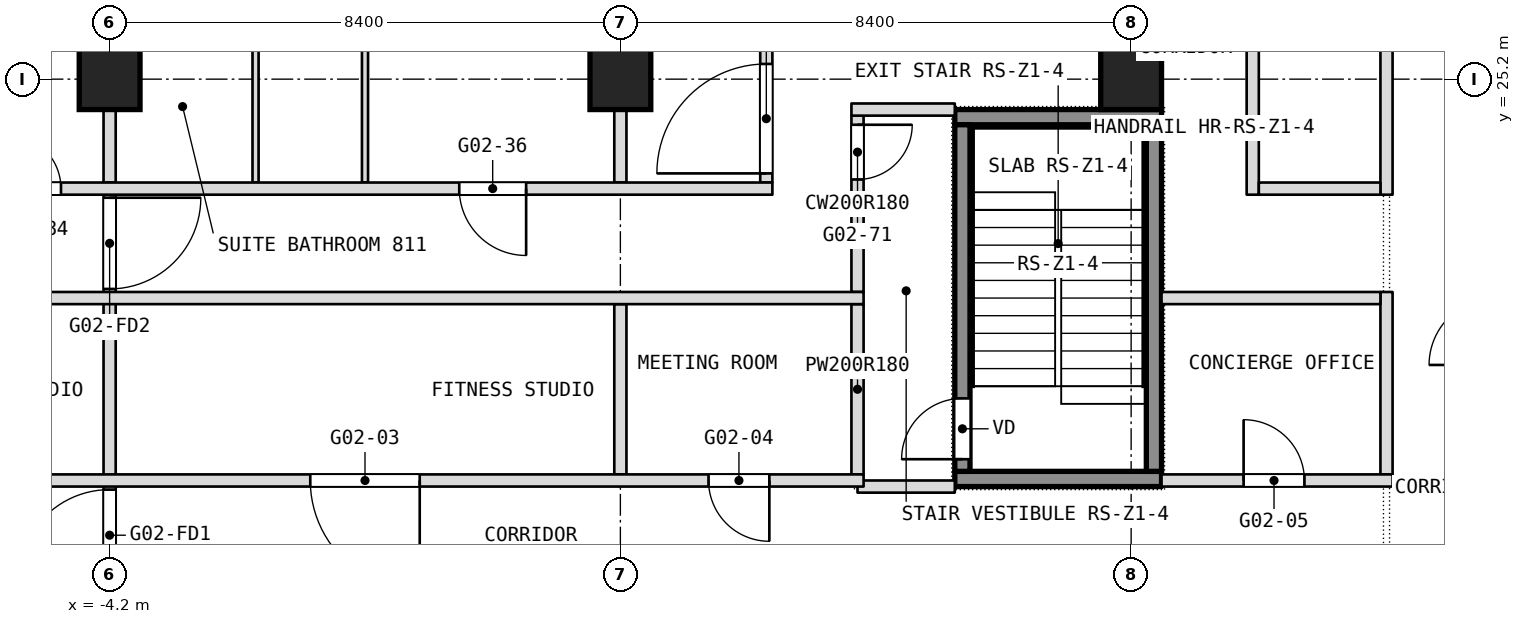
"""IFC4 building model, lengths in metres.
Left out: names, types, materials, properties, quantities, classifications, styles, units other than length and angle.
Written with IfcOpenShell. Run it as: python <this file> out.ifc"""

import sys

from ifc_helpers import new_model, si_unit, direction, frame, frame_2d, origin, origin_2d, place, context, subcontext, project, spatial, rectangle, extrude, element, fill, save


model = new_model("IFC4")
c1 = context("Model", 3, precision=1e-05, world=origin(), true_north=direction((0.0, 1.0)))
c2 = subcontext(c1, "Body", "Model", "MODEL_VIEW")
j1 = project(units=[si_unit("LENGTHUNIT", "METRE"), si_unit("PLANEANGLEUNIT", "RADIAN")], contexts=[c1])
p1 = place(None, origin())
s1 = spatial("IfcSite", under=j1, at=p1, CompositionType="ELEMENT")
p2 = place(p1, origin())
s2 = spatial("IfcBuilding", under=s1, at=p2, CompositionType="ELEMENT")
p3 = place(p2, frame((0.0, 0.0, 43.7)))
s3 = spatial("IfcBuildingStorey", under=s2, at=p3, CompositionType="ELEMENT", Elevation=43.7)
for number, where, z_axis, x_axis in (
    (1, (-4.2, 25.2, 0.0), (0.0, 0.0, 1.0), (1.0, 0.0, 0.0)),
    (2, (4.2, 25.2, 0.0), (0.0, 0.0, 1.0), (1.0, 0.0, 0.0)),
    (3, (12.6, 25.2, 0.0), (0.0, 0.0, 1.0), (1.0, 0.0, 0.0)),
):
    element("IfcColumn", number, at=place(p3, frame(where, z_axis=z_axis, x_axis=x_axis)), inside=s3, PredefinedType="COLUMN", context=c2, shape_type="SweptSolid", body=[
        extrude(rectangle(XDim=1.0, YDim=1.0, at=origin_2d()), origin(), (0.0, 0.0, 1.0), 3.6),
    ])
p4 = place(p3, frame((16.8, 18.7, 0.0), z_axis=(0.0, 0.0, 1.0), x_axis=(0.0, 1.0, 0.0)))
e4 = element("IfcWall", 4, at=p4, inside=s3, PredefinedType="PARTITIONING", context=c2, shape_type="SweptSolid", body=[
    extrude(rectangle(XDim=3.0, YDim=0.2, at=frame_2d((1.5, 0.0))), origin(), (0.0, 0.0, 1.0), 3.34),
])
p5 = place(p3, frame((16.8, 23.3, 0.0), z_axis=(0.0, 0.0, 1.0), x_axis=(0.0, 1.0, 0.0)))
e5 = element("IfcWall", 5, at=p5, inside=s3, PredefinedType="PARTITIONING", context=c2, shape_type="SweptSolid", body=[
    extrude(rectangle(XDim=10.24, YDim=0.2, at=frame_2d((5.12, 0.0))), origin(), (0.0, 0.0, 1.0), 3.34),
])
p6 = place(p5, frame((4.8, 0.0, 0.0)))
e6 = element("IfcOpeningElement", 6, at=p6, cuts=e5, PredefinedType="OPENING", context=c2, shape_type="SweptSolid", body=[
    extrude(rectangle(XDim=1.0, YDim=2.1, at=frame_2d((0.5, 1.05))), frame((0.0, 0.1, 0.0), z_axis=(0.0, -1.0, 0.0), x_axis=(1.0, 0.0, 0.0)), (0.0, 0.0, 1.0), 0.2),
])
p7 = place(p3, frame((14.6, 23.3, 0.0), z_axis=(0.0, 0.0, 1.0), x_axis=(0.0, 1.0, 0.0)))
e7 = element("IfcWall", 7, at=p7, inside=s3, PredefinedType="PARTITIONING", context=c2, shape_type="SweptSolid", body=[
    extrude(rectangle(XDim=3.4, YDim=0.2, at=frame_2d((1.7, 0.0))), origin(), (0.0, 0.0, 1.0), 3.34),
])
p8 = place(p3, frame((8.1, 18.7, 0.0), z_axis=(0.0, 0.0, 1.0), x_axis=(0.0, 1.0, 0.0)))
e8 = element("IfcWall", 8, at=p8, inside=s3, PredefinedType="PARTITIONING", context=c2, shape_type="SweptSolid", body=[
    extrude(rectangle(XDim=2.8, YDim=0.2, at=frame_2d((1.4, 0.0))), origin(), (0.0, 0.0, 1.0), 3.34),
])
p9 = place(p3, frame((8.1, 21.7, 0.0), z_axis=(0.0, 0.0, 1.0), x_axis=(0.0, 1.0, 0.0)))
e9 = element("IfcWall", 9, at=p9, inside=s3, PredefinedType="PARTITIONING", context=c2, shape_type="SweptSolid", body=[
    extrude(rectangle(XDim=2.9, YDim=0.2, at=frame_2d((1.45, 0.0))), origin(), (0.0, 0.0, 1.0), 3.34),
])
p10 = place(p9, frame((1.85, 0.0, 0.0)))
e10 = element("IfcOpeningElement", 10, at=p10, cuts=e9, PredefinedType="OPENING", context=c2, shape_type="SweptSolid", body=[
    extrude(rectangle(XDim=0.9, YDim=2.1, at=frame_2d((0.45, 1.05))), frame((0.0, 0.1, 0.0), z_axis=(0.0, -1.0, 0.0), x_axis=(1.0, 0.0, 0.0)), (0.0, 0.0, 1.0), 0.2),
])
p11 = place(p3, frame((6.6, 23.5, 0.0), z_axis=(0.0, 0.0, 1.0), x_axis=(0.0, 1.0, 0.0)))
e11 = element("IfcWall", 11, at=p11, inside=s3, PredefinedType="PARTITIONING", context=c2, shape_type="SweptSolid", body=[
    extrude(rectangle(XDim=3.4, YDim=0.2, at=frame_2d((1.7, 0.0))), origin(), (0.0, 0.0, 1.0), 3.34),
])
p12 = place(p11, frame((0.15, 0.0, 0.0)))
e12 = element("IfcOpeningElement", 12, at=p12, cuts=e11, PredefinedType="OPENING", context=c2, shape_type="SweptSolid", body=[
    extrude(rectangle(XDim=1.8, YDim=2.1, at=frame_2d((0.9, 1.05))), frame((0.0, 0.1, 0.0), z_axis=(0.0, -1.0, 0.0), x_axis=(1.0, 0.0, 0.0)), (0.0, 0.0, 1.0), 0.2),
])
p13 = place(p3, frame((4.2, 18.7, 0.0), z_axis=(0.0, 0.0, 1.0), x_axis=(0.0, 1.0, 0.0)))
e13 = element("IfcWall", 13, at=p13, inside=s3, PredefinedType="PARTITIONING", context=c2, shape_type="SweptSolid", body=[
    extrude(rectangle(XDim=2.8, YDim=0.2, at=frame_2d((1.4, 0.0))), origin(), (0.0, 0.0, 1.0), 3.34),
])
p14 = place(p3, frame((4.2, 23.5, 0.0), z_axis=(0.0, 0.0, 1.0), x_axis=(0.0, 1.0, 0.0)))
e14 = element("IfcWall", 14, at=p14, inside=s3, PredefinedType="PARTITIONING", context=c2, shape_type="SweptSolid", body=[
    extrude(rectangle(XDim=10.04, YDim=0.2, at=frame_2d((5.02, 0.0))), origin(), (0.0, 0.0, 1.0), 3.34),
])
p15 = place(p3, frame((0.0, 23.5, 0.0), z_axis=(0.0, 0.0, 1.0), x_axis=(0.0, 1.0, 0.0)))
e15 = element("IfcWall", 15, at=p15, inside=s3, PredefinedType="PARTITIONING", context=c2, shape_type="SweptSolid", body=[
    extrude(rectangle(XDim=10.04, YDim=0.1, at=frame_2d((5.02, 0.0))), origin(), (0.0, 0.0, 1.0), 3.34),
])
p16 = place(p15, frame((5.57, 0.0, 0.0)))
e16 = element("IfcOpeningElement", 16, at=p16, cuts=e15, PredefinedType="OPENING", context=c2, shape_type="SweptSolid", body=[
    extrude(rectangle(XDim=0.9, YDim=2.1, at=frame_2d((0.45, 1.05))), frame((0.0, 0.05, 0.0), z_axis=(0.0, -1.0, 0.0), x_axis=(1.0, 0.0, 0.0)), (0.0, 0.0, 1.0), 0.1),
])
p17 = place(p3, frame((-1.8, 23.5, 0.0), z_axis=(0.0, 0.0, 1.0), x_axis=(0.0, 1.0, 0.0)))
e17 = element("IfcWall", 17, at=p17, inside=s3, PredefinedType="PARTITIONING", context=c2, shape_type="SweptSolid", body=[
    extrude(rectangle(XDim=3.55, YDim=0.1, at=frame_2d((1.775, 0.0))), origin(), (0.0, 0.0, 1.0), 3.34),
])
p18 = place(p3, frame((-4.2, 16.8, 0.0), z_axis=(0.0, 0.0, 1.0), x_axis=(0.0, 1.0, 0.0)))
e18 = element("IfcWall", 18, at=p18, inside=s3, PredefinedType="PARTITIONING", context=c2, shape_type="SweptSolid", body=[
    extrude(rectangle(XDim=6.7, YDim=0.2, at=frame_2d((3.35, 0.0))), origin(), (0.0, 0.0, 1.0), 3.34),
])
p19 = place(p18, frame((0.15, 0.0, 0.0)))
e19 = element("IfcOpeningElement", 19, at=p19, cuts=e18, PredefinedType="OPENING", context=c2, shape_type="SweptSolid", body=[
    extrude(rectangle(XDim=1.5, YDim=2.1, at=frame_2d((0.75, 1.05))), frame((0.0, 0.1, 0.0), z_axis=(0.0, -1.0, 0.0), x_axis=(1.0, 0.0, 0.0)), (0.0, 0.0, 1.0), 0.2),
])
p20 = place(p18, frame((4.95, 0.0, 0.0)))
e20 = element("IfcOpeningElement", 20, at=p20, cuts=e18, PredefinedType="OPENING", context=c2, shape_type="SweptSolid", body=[
    extrude(rectangle(XDim=1.5, YDim=2.1, at=frame_2d((0.75, 1.05))), frame((0.0, 0.1, 0.0), z_axis=(0.0, -1.0, 0.0), x_axis=(1.0, 0.0, 0.0)), (0.0, 0.0, 1.0), 0.2),
])
p21 = place(p3, frame((-4.2, 23.5, 0.0), z_axis=(0.0, 0.0, 1.0), x_axis=(0.0, 1.0, 0.0)))
e21 = element("IfcWall", 21, at=p21, inside=s3, PredefinedType="PARTITIONING", context=c2, shape_type="SweptSolid", body=[
    extrude(rectangle(XDim=10.04, YDim=0.2, at=frame_2d((5.02, 0.0))), origin(), (0.0, 0.0, 1.0), 3.34),
])
p22 = place(p3, frame((8.1, 18.5, 0.0), z_axis=(0.0, 0.0, 1.0), x_axis=(1.0, 0.0, 0.0)))
e22 = element("IfcWall", 22, at=p22, inside=s3, PredefinedType="PARTITIONING", context=c2, shape_type="SweptSolid", body=[
    extrude(rectangle(XDim=1.6, YDim=0.2, at=frame_2d((0.8, 0.0))), origin(), (0.0, 0.0, 1.0), 3.34),
])
p23 = place(p3, frame((-16.9, 18.6, 0.0), z_axis=(0.0, 0.0, 1.0), x_axis=(1.0, 0.0, 0.0)))
e23 = element("IfcWall", 23, at=p23, inside=s3, PredefinedType="PARTITIONING", context=c2, shape_type="SweptSolid", body=[
    extrude(rectangle(XDim=25.1, YDim=0.2, at=frame_2d((12.55, 0.0))), origin(), (0.0, 0.0, 1.0), 3.34),
])
p24 = place(p23, frame((1.7, 0.0, 0.0)))
e24 = element("IfcOpeningElement", 24, at=p24, cuts=e23, PredefinedType="OPENING", context=c2, shape_type="SweptSolid", body=[
    extrude(rectangle(XDim=1.0, YDim=2.1, at=frame_2d((0.5, 1.05))), frame((0.0, 0.1, 0.0), z_axis=(0.0, -1.0, 0.0), x_axis=(1.0, 0.0, 0.0)), (0.0, 0.0, 1.0), 0.2),
])
p25 = place(p23, frame((7.6, 0.0, 0.0)))
e25 = element("IfcOpeningElement", 25, at=p25, cuts=e23, PredefinedType="OPENING", context=c2, shape_type="SweptSolid", body=[
    extrude(rectangle(XDim=1.8, YDim=2.1, at=frame_2d((0.9, 1.05))), frame((0.0, 0.1, 0.0), z_axis=(0.0, -1.0, 0.0), x_axis=(1.0, 0.0, 0.0)), (0.0, 0.0, 1.0), 0.2),
])
p26 = place(p23, frame((16.0, 0.0, 0.0)))
e26 = element("IfcOpeningElement", 26, at=p26, cuts=e23, PredefinedType="OPENING", context=c2, shape_type="SweptSolid", body=[
    extrude(rectangle(XDim=1.8, YDim=2.1, at=frame_2d((0.9, 1.05))), frame((0.0, 0.1, 0.0), z_axis=(0.0, -1.0, 0.0), x_axis=(1.0, 0.0, 0.0)), (0.0, 0.0, 1.0), 0.2),
])
p27 = place(p23, frame((22.55, 0.0, 0.0)))
e27 = element("IfcOpeningElement", 27, at=p27, cuts=e23, PredefinedType="OPENING", context=c2, shape_type="SweptSolid", body=[
    extrude(rectangle(XDim=1.0, YDim=2.1, at=frame_2d((0.5, 1.05))), frame((0.0, 0.1, 0.0), z_axis=(0.0, -1.0, 0.0), x_axis=(1.0, 0.0, 0.0)), (0.0, 0.0, 1.0), 0.2),
])
p28 = place(p3, frame((13.1, 18.6, 0.0), z_axis=(0.0, 0.0, 1.0), x_axis=(1.0, 0.0, 0.0)))
e28 = element("IfcWall", 28, at=p28, inside=s3, PredefinedType="PARTITIONING", context=c2, shape_type="SweptSolid", body=[
    extrude(rectangle(XDim=3.8, YDim=0.2, at=frame_2d((1.9, 0.0))), origin(), (0.0, 0.0, 1.0), 3.34),
])
p29 = place(p28, frame((1.35, 0.0, 0.0)))
e29 = element("IfcOpeningElement", 29, at=p29, cuts=e28, PredefinedType="OPENING", context=c2, shape_type="SweptSolid", body=[
    extrude(rectangle(XDim=1.0, YDim=2.1, at=frame_2d((0.5, 1.05))), frame((0.0, 0.1, 0.0), z_axis=(0.0, -1.0, 0.0), x_axis=(1.0, 0.0, 0.0)), (0.0, 0.0, 1.0), 0.2),
])
p30 = place(p3, frame((-16.7, 21.6, 0.0), z_axis=(0.0, 0.0, 1.0), x_axis=(1.0, 0.0, 0.0)))
e30 = element("IfcWall", 30, at=p30, inside=s3, PredefinedType="PARTITIONING", context=c2, shape_type="SweptSolid", body=[
    extrude(rectangle(XDim=24.9, YDim=0.2, at=frame_2d((12.45, 0.0))), origin(), (0.0, 0.0, 1.0), 3.34),
])
p31 = place(p3, frame((13.1, 21.6, 0.0), z_axis=(0.0, 0.0, 1.0), x_axis=(1.0, 0.0, 0.0)))
e31 = element("IfcWall", 31, at=p31, inside=s3, PredefinedType="PARTITIONING", context=c2, shape_type="SweptSolid", body=[
    extrude(rectangle(XDim=3.6, YDim=0.2, at=frame_2d((1.8, 0.0))), origin(), (0.0, 0.0, 1.0), 3.34),
])
p32 = place(p3, frame((-16.7, 23.4, 0.0), z_axis=(0.0, 0.0, 1.0), x_axis=(1.0, 0.0, 0.0)))
e32 = element("IfcWall", 32, at=p32, inside=s3, PredefinedType="PARTITIONING", context=c2, shape_type="SweptSolid", body=[
    extrude(rectangle(XDim=23.4, YDim=0.2, at=frame_2d((11.7, 0.0))), origin(), (0.0, 0.0, 1.0), 3.34),
])
p33 = place(p32, frame((2.4, 0.0, 0.0)))
e33 = element("IfcOpeningElement", 33, at=p33, cuts=e32, PredefinedType="OPENING", context=c2, shape_type="SweptSolid", body=[
    extrude(rectangle(XDim=0.9, YDim=2.1, at=frame_2d((0.45, 1.05))), frame((0.0, 0.1, 0.0), z_axis=(0.0, -1.0, 0.0), x_axis=(1.0, 0.0, 0.0)), (0.0, 0.0, 1.0), 0.2),
])
p34 = place(p32, frame((4.9, 0.0, 0.0)))
e34 = element("IfcOpeningElement", 34, at=p34, cuts=e32, PredefinedType="OPENING", context=c2, shape_type="SweptSolid", body=[
    extrude(rectangle(XDim=0.9, YDim=2.1, at=frame_2d((0.45, 1.05))), frame((0.0, 0.1, 0.0), z_axis=(0.0, -1.0, 0.0), x_axis=(1.0, 0.0, 0.0)), (0.0, 0.0, 1.0), 0.2),
])
p35 = place(p32, frame((10.8, 0.0, 0.0)))
e35 = element("IfcOpeningElement", 35, at=p35, cuts=e32, PredefinedType="OPENING", context=c2, shape_type="SweptSolid", body=[
    extrude(rectangle(XDim=0.9, YDim=2.1, at=frame_2d((0.45, 1.05))), frame((0.0, 0.1, 0.0), z_axis=(0.0, -1.0, 0.0), x_axis=(1.0, 0.0, 0.0)), (0.0, 0.0, 1.0), 0.2),
])
p36 = place(p32, frame((18.25, 0.0, 0.0)))
e36 = element("IfcOpeningElement", 36, at=p36, cuts=e32, PredefinedType="OPENING", context=c2, shape_type="SweptSolid", body=[
    extrude(rectangle(XDim=1.1, YDim=2.1, at=frame_2d((0.55, 1.05))), frame((0.0, 0.1, 0.0), z_axis=(0.0, -1.0, 0.0), x_axis=(1.0, 0.0, 0.0)), (0.0, 0.0, 1.0), 0.2),
])
p37 = place(p3, frame((14.7, 23.4, 0.0), z_axis=(0.0, 0.0, 1.0), x_axis=(1.0, 0.0, 0.0)))
e37 = element("IfcWall", 37, at=p37, inside=s3, PredefinedType="PARTITIONING", context=c2, shape_type="SweptSolid", body=[
    extrude(rectangle(XDim=2.0, YDim=0.2, at=frame_2d((1.0, 0.0))), origin(), (0.0, 0.0, 1.0), 3.34),
])
p38 = place(p3, frame((8.0, 24.7, 0.0), z_axis=(0.0, 0.0, 1.0), x_axis=(1.0, 0.0, 0.0)))
e38 = element("IfcWall", 38, at=p38, inside=s3, PredefinedType="PARTITIONING", context=c2, shape_type="SweptSolid", body=[
    extrude(rectangle(XDim=1.7, YDim=0.2, at=frame_2d((0.85, 0.0))), origin(), (0.0, 0.0, 1.0), 3.34),
])
for number, where, z_axis, x_axis in (
    (39, (9.7, 18.625, 0.1), (0.0, 0.0, 1.0), (1.0, 0.0, 0.0)),
    (40, (9.7, 24.575, 0.1), (0.0, 0.0, 1.0), (1.0, 0.0, 0.0)),
):
    element("IfcWall", number, at=place(p3, frame(where, z_axis=z_axis, x_axis=x_axis)), inside=s3, PredefinedType="SHEAR", context=c2, shape_type="SweptSolid", body=[
        extrude(rectangle(XDim=3.4, YDim=0.25, at=frame_2d((1.7, 0.0))), origin(), (0.0, 0.0, 1.0), 3.6),
    ])
p39 = place(p3, frame((9.825, 18.75, 0.1), z_axis=(0.0, 0.0, 1.0), x_axis=(0.0, 1.0, 0.0)))
e41 = element("IfcWall", 41, at=p39, inside=s3, PredefinedType="SHEAR", context=c2, shape_type="SweptSolid", body=[
    extrude(rectangle(XDim=5.7, YDim=0.25, at=frame_2d((2.85, 0.0))), origin(), (0.0, 0.0, 1.0), 3.6),
])
p40 = place(p39, frame((0.2, 0.0, 0.0)))
e42 = element("IfcOpeningElement", 42, at=p40, cuts=e41, PredefinedType="OPENING", context=c2, shape_type="SweptSolid", body=[
    extrude(rectangle(XDim=1.0, YDim=2.1, at=frame_2d((0.5, 1.05))), frame((0.0, 0.125, 0.0), z_axis=(0.0, -1.0, 0.0), x_axis=(1.0, 0.0, 0.0)), (0.0, 0.0, 1.0), 0.25),
])
p41 = place(p3, frame((12.975, 18.75, 0.1), z_axis=(0.0, 0.0, 1.0), x_axis=(0.0, 1.0, 0.0)))
e43 = element("IfcWall", 43, at=p41, inside=s3, PredefinedType="SHEAR", context=c2, shape_type="SweptSolid", body=[
    extrude(rectangle(XDim=5.7, YDim=0.25, at=frame_2d((2.85, 0.0))), origin(), (0.0, 0.0, 1.0), 3.6),
])
p42 = place(p10, origin())
e44 = element("IfcDoor", 44, at=p42, inside=s3, OperationType="SINGLE_SWING_LEFT", PredefinedType="DOOR", context=c2, shape_type="SweptSolid", body=[
    extrude(rectangle(XDim=0.9, YDim=2.1, at=frame_2d((0.45, 1.05))), frame((0.0, 0.025, 0.0), z_axis=(0.0, -1.0, 0.0), x_axis=(1.0, 0.0, 0.0)), (0.0, 0.0, 1.0), 0.05),
])
fill(e10, e44)
p43 = place(p12, origin())
e45 = element("IfcDoor", 45, at=p43, inside=s3, OperationType="DOUBLE_DOOR_SINGLE_SWING", PredefinedType="DOOR", context=c2, shape_type="SweptSolid", body=[
    extrude(rectangle(XDim=1.8, YDim=2.1, at=frame_2d((0.9, 1.05))), frame((0.0, 0.025, 0.0), z_axis=(0.0, -1.0, 0.0), x_axis=(1.0, 0.0, 0.0)), (0.0, 0.0, 1.0), 0.05),
])
fill(e12, e45)
p44 = place(p26, origin())
e46 = element("IfcDoor", 46, at=p44, inside=s3, OperationType="DOUBLE_DOOR_SINGLE_SWING", PredefinedType="DOOR", context=c2, shape_type="SweptSolid", body=[
    extrude(rectangle(XDim=1.8, YDim=2.1, at=frame_2d((0.9, 1.05))), frame((0.0, 0.025, 0.0), z_axis=(0.0, -1.0, 0.0), x_axis=(1.0, 0.0, 0.0)), (0.0, 0.0, 1.0), 0.05),
])
fill(e26, e46)
p45 = place(p27, origin())
e47 = element("IfcDoor", 47, at=p45, inside=s3, OperationType="SINGLE_SWING_RIGHT", PredefinedType="DOOR", context=c2, shape_type="SweptSolid", body=[
    extrude(rectangle(XDim=1.0, YDim=2.1, at=frame_2d((0.5, 1.05))), frame((0.0, 0.025, 0.0), z_axis=(0.0, -1.0, 0.0), x_axis=(1.0, 0.0, 0.0)), (0.0, 0.0, 1.0), 0.05),
])
fill(e27, e47)
p46 = place(p29, origin())
e48 = element("IfcDoor", 48, at=p46, inside=s3, OperationType="SINGLE_SWING_LEFT", PredefinedType="DOOR", context=c2, shape_type="SweptSolid", body=[
    extrude(rectangle(XDim=1.0, YDim=2.1, at=frame_2d((0.5, 1.05))), frame((0.0, 0.025, 0.0), z_axis=(0.0, -1.0, 0.0), x_axis=(1.0, 0.0, 0.0)), (0.0, 0.0, 1.0), 0.05),
])
fill(e29, e48)
p47 = place(p35, origin())
e49 = element("IfcDoor", 49, at=p47, inside=s3, OperationType="SINGLE_SWING_LEFT", PredefinedType="DOOR", context=c2, shape_type="SweptSolid", body=[
    extrude(rectangle(XDim=0.9, YDim=2.1, at=frame_2d((0.45, 1.05))), frame((0.0, 0.025, 0.0), z_axis=(0.0, -1.0, 0.0), x_axis=(1.0, 0.0, 0.0)), (0.0, 0.0, 1.0), 0.05),
])
fill(e35, e49)
p48 = place(p36, origin())
e50 = element("IfcDoor", 50, at=p48, inside=s3, OperationType="SINGLE_SWING_LEFT", PredefinedType="DOOR", context=c2, shape_type="SweptSolid", body=[
    extrude(rectangle(XDim=1.1, YDim=2.1, at=frame_2d((0.55, 1.05))), frame((0.0, 0.025, 0.0), z_axis=(0.0, -1.0, 0.0), x_axis=(1.0, 0.0, 0.0)), (0.0, 0.0, 1.0), 0.05),
])
fill(e36, e50)
p49 = place(p40, origin())
e51 = element("IfcDoor", 51, at=p49, inside=s3, OperationType="SINGLE_SWING_LEFT", PredefinedType="DOOR", context=c2, shape_type="SweptSolid", body=[
    extrude(rectangle(XDim=1.0, YDim=2.1, at=frame_2d((0.5, 1.05))), frame((0.0, 0.025, 0.0), z_axis=(0.0, -1.0, 0.0), x_axis=(1.0, 0.0, 0.0)), (0.0, 0.0, 1.0), 0.05),
])
fill(e42, e51)
p50 = place(p19, origin())
e52 = element("IfcDoor", 52, at=p50, inside=s3, OperationType="DOUBLE_DOOR_DOUBLE_SWING", PredefinedType="DOOR", context=c2, shape_type="SweptSolid", body=[
    extrude(rectangle(XDim=1.5, YDim=2.1, at=frame_2d((0.75, 1.05))), frame((0.0, 0.025, 0.0), z_axis=(0.0, -1.0, 0.0), x_axis=(1.0, 0.0, 0.0)), (0.0, 0.0, 1.0), 0.05),
])
fill(e19, e52)
p51 = place(p20, origin())
e53 = element("IfcDoor", 53, at=p51, inside=s3, OperationType="DOUBLE_DOOR_DOUBLE_SWING", PredefinedType="DOOR", context=c2, shape_type="SweptSolid", body=[
    extrude(rectangle(XDim=1.5, YDim=2.1, at=frame_2d((0.75, 1.05))), frame((0.0, 0.025, 0.0), z_axis=(0.0, -1.0, 0.0), x_axis=(1.0, 0.0, 0.0)), (0.0, 0.0, 1.0), 0.05),
])
fill(e20, e53)
save(model, sys.argv[1])
